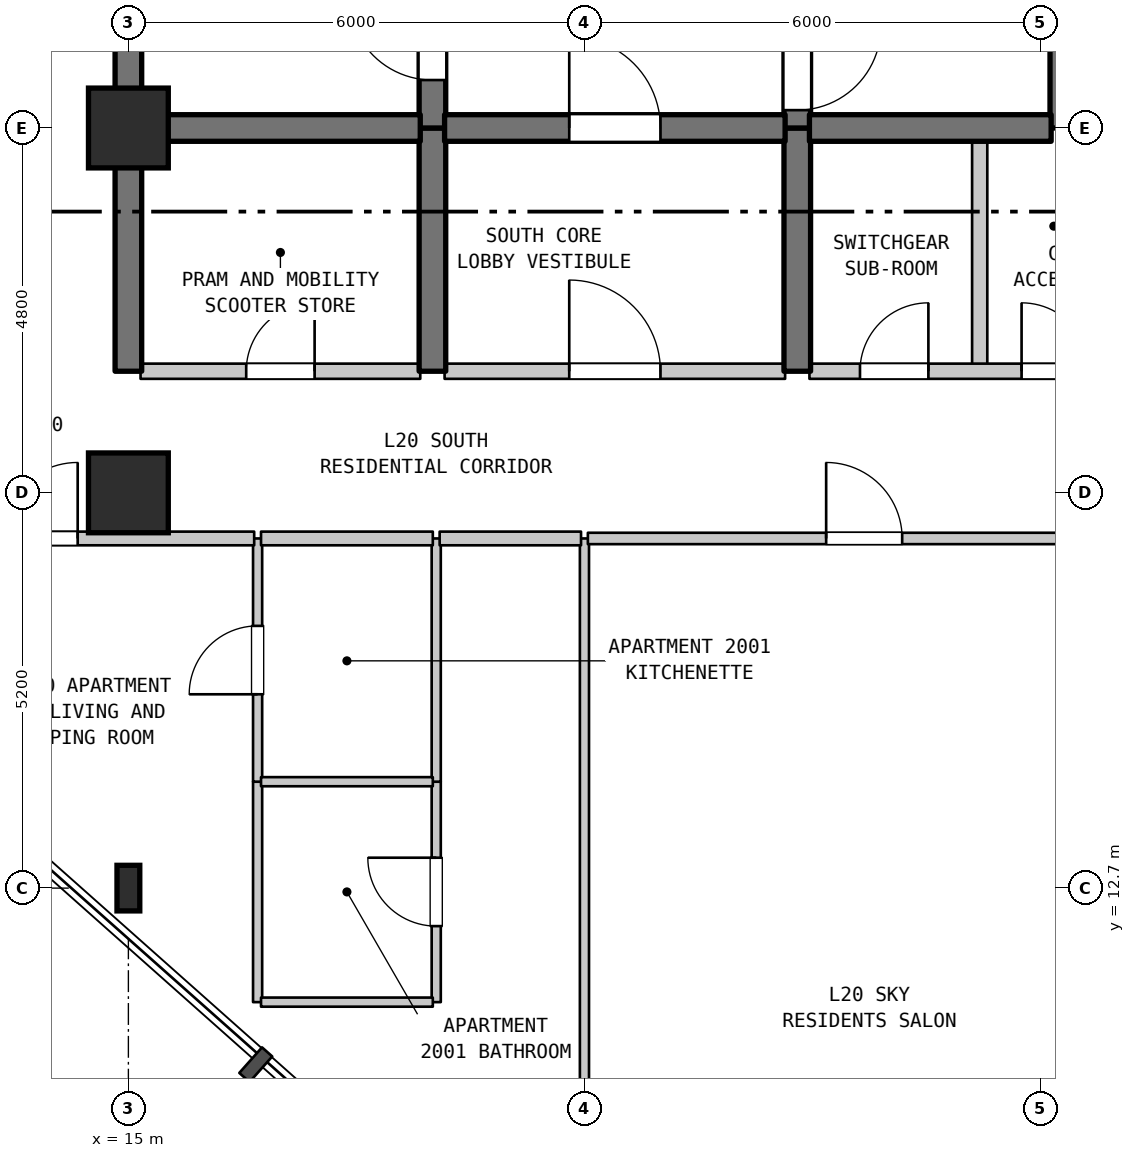
"""IFC4 building model, lengths in metres.
Left out: names, types, materials, properties, quantities, classifications, styles, units other than length and angle.
Written with IfcOpenShell. Run it as: python <this file> out.ifc"""

import sys

from ifc_helpers import new_model, si_unit, direction, frame, frame_2d, origin, origin_2d, place, context, subcontext, project, spatial, rectangle, i_section, extrude, element, fill, save


model = new_model("IFC4")
c1 = context("Model", 3, precision=1e-05, world=origin(), true_north=direction((0.0, 1.0)))
c2 = subcontext(c1, "Body", "Model", "MODEL_VIEW")
j1 = project(units=[si_unit("LENGTHUNIT", "METRE"), si_unit("PLANEANGLEUNIT", "RADIAN")], contexts=[c1])
p1 = place(None, origin())
s1 = spatial("IfcSite", under=j1, at=p1, CompositionType="ELEMENT")
p2 = place(p1, origin())
s2 = spatial("IfcBuilding", under=s1, at=p2, CompositionType="ELEMENT")
p3 = place(p2, frame((0.0, 0.0, 86.4)))
s3 = spatial("IfcBuildingStorey", under=s2, at=p3, CompositionType="ELEMENT", Elevation=86.4)
p4 = place(p3, frame((15.0, 12.7, 0.0), z_axis=(0.0, 0.0, 1.0), x_axis=(1.0, 0.0, 0.0)))
e1 = element("IfcColumn", 1, at=p4, inside=s3, PredefinedType="COLUMN", context=c2, shape_type="SweptSolid", body=[
    extrude(i_section(OverallWidth=0.3, OverallDepth=0.6, WebThickness=0.015, FlangeThickness=0.03, FilletRadius=0.027, at=origin_2d()), origin(), (0.0, 0.0, 1.0), 4.5),
])
for number, where, z_axis, x_axis in (
    (2, (15.0, 17.9, 0.0), (0.0, 0.0, 1.0), (1.0, 0.0, 0.0)),
    (3, (15.0, 22.7, 0.0), (0.0, 0.0, 1.0), (1.0, 0.0, 0.0)),
):
    element("IfcColumn", number, at=place(p3, frame(where, z_axis=z_axis, x_axis=x_axis)), inside=s3, PredefinedType="COLUMN", context=c2, shape_type="SweptSolid", body=[
        extrude(rectangle(XDim=1.05, YDim=1.05, at=origin_2d()), origin(), (0.0, 0.0, 1.0), 4.5),
    ])
p5 = place(p3, frame((15.0, 19.5, 0.0), z_axis=(0.0, 0.0, 1.0), x_axis=(0.0, 1.0, 0.0)))
e4 = element("IfcWall", 4, at=p5, inside=s3, PredefinedType="SHEAR", context=c2, shape_type="SweptSolid", body=[
    extrude(rectangle(XDim=3.2, YDim=0.35, at=frame_2d((1.6, 0.0))), origin(), (0.0, 0.0, 1.0), 4.185),
])
p6 = place(p3, frame((15.0, 22.7, 0.0), z_axis=(0.0, 0.0, 1.0), x_axis=(0.0, 1.0, 0.0)))
e5 = element("IfcWall", 5, at=p6, inside=s3, PredefinedType="SHEAR", context=c2, shape_type="SweptSolid", body=[
    extrude(rectangle(XDim=6.8, YDim=0.35, at=frame_2d((3.4, 0.0))), origin(), (0.0, 0.0, 1.0), 4.185),
])
p7 = place(p3, frame((16.7, 11.2, 0.0), z_axis=(0.0, 0.0, 1.0), x_axis=(0.0, 1.0, 0.0)))
e6 = element("IfcWall", 6, at=p7, inside=s3, PredefinedType="PARTITIONING", context=c2, shape_type="SweptSolid", body=[
    extrude(rectangle(XDim=2.9, YDim=0.12, at=frame_2d((1.45, 0.0))), origin(), (0.0, 0.0, 1.0), 4.185),
])
p8 = place(p3, frame((16.7, 14.1, 0.0), z_axis=(0.0, 0.0, 1.0), x_axis=(0.0, 1.0, 0.0)))
e7 = element("IfcWall", 7, at=p8, inside=s3, PredefinedType="PARTITIONING", context=c2, shape_type="SweptSolid", body=[
    extrude(rectangle(XDim=3.2, YDim=0.12, at=frame_2d((1.6, 0.0))), origin(), (0.0, 0.0, 1.0), 4.185),
])
p9 = place(p8, frame((1.15, 0.0, 0.0)))
e8 = element("IfcOpeningElement", 8, at=p9, cuts=e7, PredefinedType="OPENING", context=c2, shape_type="SweptSolid", body=[
    extrude(rectangle(XDim=0.9, YDim=2.15, at=frame_2d((0.45, 1.075))), frame((0.0, 0.07, 0.0), z_axis=(0.0, -1.0, 0.0), x_axis=(1.0, 0.0, 0.0)), (0.0, 0.0, 1.0), 0.14),
])
p10 = place(p3, frame((19.0, 19.5, 0.0), z_axis=(0.0, 0.0, 1.0), x_axis=(0.0, 1.0, 0.0)))
e9 = element("IfcWall", 9, at=p10, inside=s3, PredefinedType="SHEAR", context=c2, shape_type="SweptSolid", body=[
    extrude(rectangle(XDim=3.2, YDim=0.35, at=frame_2d((1.6, 0.0))), origin(), (0.0, 0.0, 1.0), 4.185),
])
p11 = place(p3, frame((19.0, 22.7, 0.0), z_axis=(0.0, 0.0, 1.0), x_axis=(0.0, 1.0, 0.0)))
e10 = element("IfcWall", 10, at=p11, inside=s3, PredefinedType="SHEAR", context=c2, shape_type="SweptSolid", body=[
    extrude(rectangle(XDim=5.5, YDim=0.35, at=frame_2d((2.75, 0.0))), origin(), (0.0, 0.0, 1.0), 4.185),
])
p12 = place(p11, frame((0.631, 0.0, 0.0)))
e11 = element("IfcOpeningElement", 11, at=p12, cuts=e10, PredefinedType="OPENING", context=c2, shape_type="SweptSolid", body=[
    extrude(rectangle(XDim=1.1, YDim=2.15, at=frame_2d((0.55, 1.075))), frame((0.0, 0.185, 0.0), z_axis=(0.0, -1.0, 0.0), x_axis=(1.0, 0.0, 0.0)), (0.0, 0.0, 1.0), 0.37),
])
p13 = place(p3, frame((19.05, 11.2, 0.0), z_axis=(0.0, 0.0, 1.0), x_axis=(0.0, 1.0, 0.0)))
e12 = element("IfcWall", 12, at=p13, inside=s3, PredefinedType="PARTITIONING", context=c2, shape_type="SweptSolid", body=[
    extrude(rectangle(XDim=2.9, YDim=0.12, at=frame_2d((1.45, 0.0))), origin(), (0.0, 0.0, 1.0), 4.185),
])
p14 = place(p13, frame((1.0, 0.0, 0.0)))
e13 = element("IfcOpeningElement", 13, at=p14, cuts=e12, PredefinedType="OPENING", context=c2, shape_type="SweptSolid", body=[
    extrude(rectangle(XDim=0.9, YDim=2.1, at=frame_2d((0.45, 1.05))), frame((0.0, 0.07, 0.0), z_axis=(0.0, -1.0, 0.0), x_axis=(1.0, 0.0, 0.0)), (0.0, 0.0, 1.0), 0.14),
])
p15 = place(p3, frame((19.05, 14.1, 0.0), z_axis=(0.0, 0.0, 1.0), x_axis=(0.0, 1.0, 0.0)))
e14 = element("IfcWall", 14, at=p15, inside=s3, PredefinedType="PARTITIONING", context=c2, shape_type="SweptSolid", body=[
    extrude(rectangle(XDim=3.2, YDim=0.12, at=frame_2d((1.6, 0.0))), origin(), (0.0, 0.0, 1.0), 4.185),
])
p16 = place(p3, frame((21.0, 6.71, 0.0), z_axis=(0.0, 0.0, 1.0), x_axis=(0.0, 1.0, 0.0)))
e15 = element("IfcWall", 15, at=p16, inside=s3, PredefinedType="PARTITIONING", context=c2, shape_type="SweptSolid", body=[
    extrude(rectangle(XDim=10.59, YDim=0.12, at=frame_2d((5.295, 0.0))), origin(), (0.0, 0.0, 1.0), 4.185),
])
p17 = place(p3, frame((23.8, 19.5, 0.0), z_axis=(0.0, 0.0, 1.0), x_axis=(0.0, 1.0, 0.0)))
e16 = element("IfcWall", 16, at=p17, inside=s3, PredefinedType="SHEAR", context=c2, shape_type="SweptSolid", body=[
    extrude(rectangle(XDim=3.2, YDim=0.35, at=frame_2d((1.6, 0.0))), origin(), (0.0, 0.0, 1.0), 4.185),
])
p18 = place(p3, frame((23.8, 22.7, 0.0), z_axis=(0.0, 0.0, 1.0), x_axis=(0.0, 1.0, 0.0)))
e17 = element("IfcWall", 17, at=p18, inside=s3, PredefinedType="SHEAR", context=c2, shape_type="SweptSolid", body=[
    extrude(rectangle(XDim=5.5, YDim=0.35, at=frame_2d((2.75, 0.0))), origin(), (0.0, 0.0, 1.0), 4.185),
])
p19 = place(p18, frame((0.235, 0.0, 0.0)))
e18 = element("IfcOpeningElement", 18, at=p19, cuts=e17, PredefinedType="OPENING", context=c2, shape_type="SweptSolid", body=[
    extrude(rectangle(XDim=1.1, YDim=2.15, at=frame_2d((0.55, 1.075))), frame((0.0, 0.185, 0.0), z_axis=(0.0, -1.0, 0.0), x_axis=(1.0, 0.0, 0.0)), (0.0, 0.0, 1.0), 0.37),
])
p20 = place(p3, frame((26.2, 19.5, 0.0), z_axis=(0.0, 0.0, 1.0), x_axis=(0.0, 1.0, 0.0)))
e19 = element("IfcWall", 19, at=p20, inside=s3, PredefinedType="STANDARD", context=c2, shape_type="SweptSolid", body=[
    extrude(rectangle(XDim=3.2, YDim=0.2, at=frame_2d((1.6, 0.0))), origin(), (0.0, 0.0, 1.0), 4.185),
])
p21 = place(p3, frame((27.3, 22.7, 0.0), z_axis=(0.0, 0.0, 1.0), x_axis=(0.0, 1.0, 0.0)))
e20 = element("IfcWall", 20, at=p21, inside=s3, PredefinedType="SHEAR", context=c2, shape_type="SweptSolid", body=[
    extrude(rectangle(XDim=2.9, YDim=0.35, at=frame_2d((1.45, 0.0))), origin(), (0.0, 0.0, 1.0), 4.185),
])
for number, where, z_axis, x_axis in (
    (21, (16.745, 11.2, 0.0), (0.0, 0.0, 1.0), (1.0, 0.0, 0.0)),
    (22, (16.745, 14.1, 0.0), (0.0, 0.0, 1.0), (1.0, 0.0, 0.0)),
):
    element("IfcWall", number, at=place(p3, frame(where, z_axis=z_axis, x_axis=x_axis)), inside=s3, PredefinedType="PARTITIONING", context=c2, shape_type="SweptSolid", body=[
        extrude(rectangle(XDim=2.26, YDim=0.12, at=frame_2d((1.13, 0.0))), origin(), (0.0, 0.0, 1.0), 4.185),
    ])
p22 = place(p3, frame((12.875, 17.3, 0.0), z_axis=(0.0, 0.0, 1.0), x_axis=(1.0, 0.0, 0.0)))
e23 = element("IfcWall", 23, at=p22, inside=s3, PredefinedType="STANDARD", context=c2, shape_type="SweptSolid", body=[
    extrude(rectangle(XDim=3.78, YDim=0.18, at=frame_2d((1.89, 0.0))), origin(), (0.0, 0.0, 1.0), 4.185),
])
p23 = place(p22, frame((0.458, 0.0, 0.0)))
e24 = element("IfcOpeningElement", 24, at=p23, cuts=e23, PredefinedType="OPENING", context=c2, shape_type="SweptSolid", body=[
    extrude(rectangle(XDim=1.0, YDim=2.15, at=frame_2d((0.5, 1.075))), frame((0.0, 0.1, 0.0), z_axis=(0.0, -1.0, 0.0), x_axis=(1.0, 0.0, 0.0)), (0.0, 0.0, 1.0), 0.2),
])
p24 = place(p3, frame((16.745, 17.3, 0.0), z_axis=(0.0, 0.0, 1.0), x_axis=(1.0, 0.0, 0.0)))
e25 = element("IfcWall", 25, at=p24, inside=s3, PredefinedType="STANDARD", context=c2, shape_type="SweptSolid", body=[
    extrude(rectangle(XDim=2.26, YDim=0.18, at=frame_2d((1.13, 0.0))), origin(), (0.0, 0.0, 1.0), 4.185),
])
p25 = place(p3, frame((19.095, 17.3, 0.0), z_axis=(0.0, 0.0, 1.0), x_axis=(1.0, 0.0, 0.0)))
e26 = element("IfcWall", 26, at=p25, inside=s3, PredefinedType="STANDARD", context=c2, shape_type="SweptSolid", body=[
    extrude(rectangle(XDim=1.86, YDim=0.18, at=frame_2d((0.93, 0.0))), origin(), (0.0, 0.0, 1.0), 4.185),
])
p26 = place(p3, frame((21.045, 17.3, 0.0), z_axis=(0.0, 0.0, 1.0), x_axis=(1.0, 0.0, 0.0)))
e27 = element("IfcWall", 27, at=p26, inside=s3, PredefinedType="STANDARD", context=c2, shape_type="SweptSolid", body=[
    extrude(rectangle(XDim=7.41, YDim=0.15, at=frame_2d((3.705, 0.0))), origin(), (0.0, 0.0, 1.0), 4.185),
])
p27 = place(p26, frame((3.135, 0.0, 0.0)))
e28 = element("IfcOpeningElement", 28, at=p27, cuts=e27, PredefinedType="OPENING", context=c2, shape_type="SweptSolid", body=[
    extrude(rectangle(XDim=1.0, YDim=2.15, at=frame_2d((0.5, 1.075))), frame((0.0, 0.085, 0.0), z_axis=(0.0, -1.0, 0.0), x_axis=(1.0, 0.0, 0.0)), (0.0, 0.0, 1.0), 0.17),
])
p28 = place(p3, frame((15.16, 19.5, 0.0), z_axis=(0.0, 0.0, 1.0), x_axis=(1.0, 0.0, 0.0)))
e29 = element("IfcWall", 29, at=p28, inside=s3, PredefinedType="STANDARD", context=c2, shape_type="SweptSolid", body=[
    extrude(rectangle(XDim=3.68, YDim=0.2, at=frame_2d((1.84, 0.0))), origin(), (0.0, 0.0, 1.0), 4.185),
])
p29 = place(p28, frame((1.39, 0.0, 0.0)))
e30 = element("IfcOpeningElement", 30, at=p29, cuts=e29, PredefinedType="OPENING", context=c2, shape_type="SweptSolid", body=[
    extrude(rectangle(XDim=0.9, YDim=2.15, at=frame_2d((0.45, 1.075))), frame((0.0, 0.11, 0.0), z_axis=(0.0, -1.0, 0.0), x_axis=(1.0, 0.0, 0.0)), (0.0, 0.0, 1.0), 0.22),
])
p30 = place(p3, frame((19.16, 19.5, 0.0), z_axis=(0.0, 0.0, 1.0), x_axis=(1.0, 0.0, 0.0)))
e31 = element("IfcWall", 31, at=p30, inside=s3, PredefinedType="STANDARD", context=c2, shape_type="SweptSolid", body=[
    extrude(rectangle(XDim=4.48, YDim=0.2, at=frame_2d((2.24, 0.0))), origin(), (0.0, 0.0, 1.0), 4.185),
])
p31 = place(p30, frame((1.64, 0.0, 0.0)))
e32 = element("IfcOpeningElement", 32, at=p31, cuts=e31, PredefinedType="OPENING", context=c2, shape_type="SweptSolid", body=[
    extrude(rectangle(XDim=1.2, YDim=2.2, at=frame_2d((0.6, 1.1))), frame((0.0, 0.11, 0.0), z_axis=(0.0, -1.0, 0.0), x_axis=(1.0, 0.0, 0.0)), (0.0, 0.0, 1.0), 0.22),
])
p32 = place(p3, frame((23.96, 19.5, 0.0), z_axis=(0.0, 0.0, 1.0), x_axis=(1.0, 0.0, 0.0)))
e33 = element("IfcWall", 33, at=p32, inside=s3, PredefinedType="STANDARD", context=c2, shape_type="SweptSolid", body=[
    extrude(rectangle(XDim=4.455, YDim=0.2, at=frame_2d((2.228, 0.0))), origin(), (0.0, 0.0, 1.0), 4.185),
])
p33 = place(p32, frame((0.665, 0.0, 0.0)))
e34 = element("IfcOpeningElement", 34, at=p33, cuts=e33, PredefinedType="OPENING", context=c2, shape_type="SweptSolid", body=[
    extrude(rectangle(XDim=0.9, YDim=2.15, at=frame_2d((0.45, 1.075))), frame((0.0, 0.11, 0.0), z_axis=(0.0, -1.0, 0.0), x_axis=(1.0, 0.0, 0.0)), (0.0, 0.0, 1.0), 0.22),
])
p34 = place(p32, frame((2.791, 0.0, 0.0)))
e35 = element("IfcOpeningElement", 35, at=p34, cuts=e33, PredefinedType="OPENING", context=c2, shape_type="SweptSolid", body=[
    extrude(rectangle(XDim=0.9, YDim=2.15, at=frame_2d((0.45, 1.075))), frame((0.0, 0.11, 0.0), z_axis=(0.0, -1.0, 0.0), x_axis=(1.0, 0.0, 0.0)), (0.0, 0.0, 1.0), 0.22),
])
p35 = place(p3, frame((15.16, 22.7, 0.0), z_axis=(0.0, 0.0, 1.0), x_axis=(1.0, 0.0, 0.0)))
e36 = element("IfcWall", 36, at=p35, inside=s3, PredefinedType="SHEAR", context=c2, shape_type="SweptSolid", body=[
    extrude(rectangle(XDim=3.68, YDim=0.35, at=frame_2d((1.84, 0.0))), origin(), (0.0, 0.0, 1.0), 4.185),
])
p36 = place(p3, frame((19.16, 22.7, 0.0), z_axis=(0.0, 0.0, 1.0), x_axis=(1.0, 0.0, 0.0)))
e37 = element("IfcWall", 37, at=p36, inside=s3, PredefinedType="SHEAR", context=c2, shape_type="SweptSolid", body=[
    extrude(rectangle(XDim=4.48, YDim=0.35, at=frame_2d((2.24, 0.0))), origin(), (0.0, 0.0, 1.0), 4.185),
])
p37 = place(p36, frame((1.64, 0.0, 0.0)))
e38 = element("IfcOpeningElement", 38, at=p37, cuts=e37, PredefinedType="OPENING", context=c2, shape_type="SweptSolid", body=[
    extrude(rectangle(XDim=1.2, YDim=2.2, at=frame_2d((0.6, 1.1))), frame((0.0, 0.185, 0.0), z_axis=(0.0, -1.0, 0.0), x_axis=(1.0, 0.0, 0.0)), (0.0, 0.0, 1.0), 0.37),
])
p38 = place(p3, frame((23.96, 22.7, 0.0), z_axis=(0.0, 0.0, 1.0), x_axis=(1.0, 0.0, 0.0)))
e39 = element("IfcWall", 39, at=p38, inside=s3, PredefinedType="SHEAR", context=c2, shape_type="SweptSolid", body=[
    extrude(rectangle(XDim=3.18, YDim=0.35, at=frame_2d((1.59, 0.0))), origin(), (0.0, 0.0, 1.0), 4.185),
])
p39 = place(p9, origin())
e40 = element("IfcDoor", 40, at=p39, inside=s3, OperationType="SINGLE_SWING_LEFT", PredefinedType="DOOR", context=c2, shape_type="SweptSolid", body=[
    extrude(rectangle(XDim=0.9, YDim=2.15, at=frame_2d((0.45, 1.075))), frame((0.0, 0.025, 0.0), z_axis=(0.0, -1.0, 0.0), x_axis=(1.0, 0.0, 0.0)), (0.0, 0.0, 1.0), 0.05),
])
fill(e8, e40)
p40 = place(p12, origin())
e41 = element("IfcDoor", 41, at=p40, inside=s3, OperationType="SINGLE_SWING_RIGHT", PredefinedType="DOOR", context=c2, shape_type="SweptSolid", body=[
    extrude(rectangle(XDim=1.1, YDim=2.15, at=frame_2d((0.55, 1.075))), frame((0.0, 0.025, 0.0), z_axis=(0.0, -1.0, 0.0), x_axis=(1.0, 0.0, 0.0)), (0.0, 0.0, 1.0), 0.05),
])
fill(e11, e41)
p41 = place(p14, origin())
e42 = element("IfcDoor", 42, at=p41, inside=s3, OperationType="SINGLE_SWING_RIGHT", PredefinedType="DOOR", context=c2, shape_type="SweptSolid", body=[
    extrude(rectangle(XDim=0.9, YDim=2.1, at=frame_2d((0.45, 1.05))), frame((0.0, 0.025, 0.0), z_axis=(0.0, -1.0, 0.0), x_axis=(1.0, 0.0, 0.0)), (0.0, 0.0, 1.0), 0.05),
])
fill(e13, e42)
p42 = place(p19, frame((1.1, 0.0, 0.0), z_axis=(0.0, 0.0, 1.0), x_axis=(-1.0, 0.0, 0.0)))
e43 = element("IfcDoor", 43, at=p42, inside=s3, OperationType="SINGLE_SWING_RIGHT", PredefinedType="DOOR", context=c2, shape_type="SweptSolid", body=[
    extrude(rectangle(XDim=1.1, YDim=2.15, at=frame_2d((0.55, 1.075))), frame((0.0, 0.025, 0.0), z_axis=(0.0, -1.0, 0.0), x_axis=(1.0, 0.0, 0.0)), (0.0, 0.0, 1.0), 0.05),
])
fill(e18, e43)
p43 = place(p23, origin())
e44 = element("IfcDoor", 44, at=p43, inside=s3, OperationType="SINGLE_SWING_RIGHT", PredefinedType="DOOR", context=c2, shape_type="SweptSolid", body=[
    extrude(rectangle(XDim=1.0, YDim=2.15, at=frame_2d((0.5, 1.075))), frame((0.0, 0.025, 0.0), z_axis=(0.0, -1.0, 0.0), x_axis=(1.0, 0.0, 0.0)), (0.0, 0.0, 1.0), 0.05),
])
fill(e24, e44)
p44 = place(p27, origin())
e45 = element("IfcDoor", 45, at=p44, inside=s3, OperationType="SINGLE_SWING_LEFT", PredefinedType="DOOR", context=c2, shape_type="SweptSolid", body=[
    extrude(rectangle(XDim=1.0, YDim=2.15, at=frame_2d((0.5, 1.075))), frame((0.0, 0.025, 0.0), z_axis=(0.0, -1.0, 0.0), x_axis=(1.0, 0.0, 0.0)), (0.0, 0.0, 1.0), 0.05),
])
fill(e28, e45)
p45 = place(p29, origin())
e46 = element("IfcDoor", 46, at=p45, inside=s3, OperationType="SINGLE_SWING_RIGHT", PredefinedType="DOOR", context=c2, shape_type="SweptSolid", body=[
    extrude(rectangle(XDim=0.9, YDim=2.15, at=frame_2d((0.45, 1.075))), frame((0.0, 0.025, 0.0), z_axis=(0.0, -1.0, 0.0), x_axis=(1.0, 0.0, 0.0)), (0.0, 0.0, 1.0), 0.05),
])
fill(e30, e46)
p46 = place(p31, origin())
e47 = element("IfcDoor", 47, at=p46, inside=s3, OperationType="SINGLE_SWING_LEFT", PredefinedType="DOOR", context=c2, shape_type="SweptSolid", body=[
    extrude(rectangle(XDim=1.2, YDim=2.2, at=frame_2d((0.6, 1.1))), frame((0.0, 0.025, 0.0), z_axis=(0.0, -1.0, 0.0), x_axis=(1.0, 0.0, 0.0)), (0.0, 0.0, 1.0), 0.05),
])
fill(e32, e47)
p47 = place(p33, origin())
e48 = element("IfcDoor", 48, at=p47, inside=s3, OperationType="SINGLE_SWING_RIGHT", PredefinedType="DOOR", context=c2, shape_type="SweptSolid", body=[
    extrude(rectangle(XDim=0.9, YDim=2.15, at=frame_2d((0.45, 1.075))), frame((0.0, 0.025, 0.0), z_axis=(0.0, -1.0, 0.0), x_axis=(1.0, 0.0, 0.0)), (0.0, 0.0, 1.0), 0.05),
])
fill(e34, e48)
p48 = place(p34, origin())
e49 = element("IfcDoor", 49, at=p48, inside=s3, OperationType="SINGLE_SWING_LEFT", PredefinedType="DOOR", context=c2, shape_type="SweptSolid", body=[
    extrude(rectangle(XDim=0.9, YDim=2.15, at=frame_2d((0.45, 1.075))), frame((0.0, 0.025, 0.0), z_axis=(0.0, -1.0, 0.0), x_axis=(1.0, 0.0, 0.0)), (0.0, 0.0, 1.0), 0.05),
])
fill(e35, e49)
p49 = place(p37, origin())
e50 = element("IfcDoor", 50, at=p49, inside=s3, OperationType="SINGLE_SWING_LEFT", PredefinedType="DOOR", context=c2, shape_type="SweptSolid", body=[
    extrude(rectangle(XDim=1.2, YDim=2.2, at=frame_2d((0.6, 1.1))), frame((0.0, 0.025, 0.0), z_axis=(0.0, -1.0, 0.0), x_axis=(1.0, 0.0, 0.0)), (0.0, 0.0, 1.0), 0.05),
])
fill(e38, e50)
save(model, sys.argv[1])
